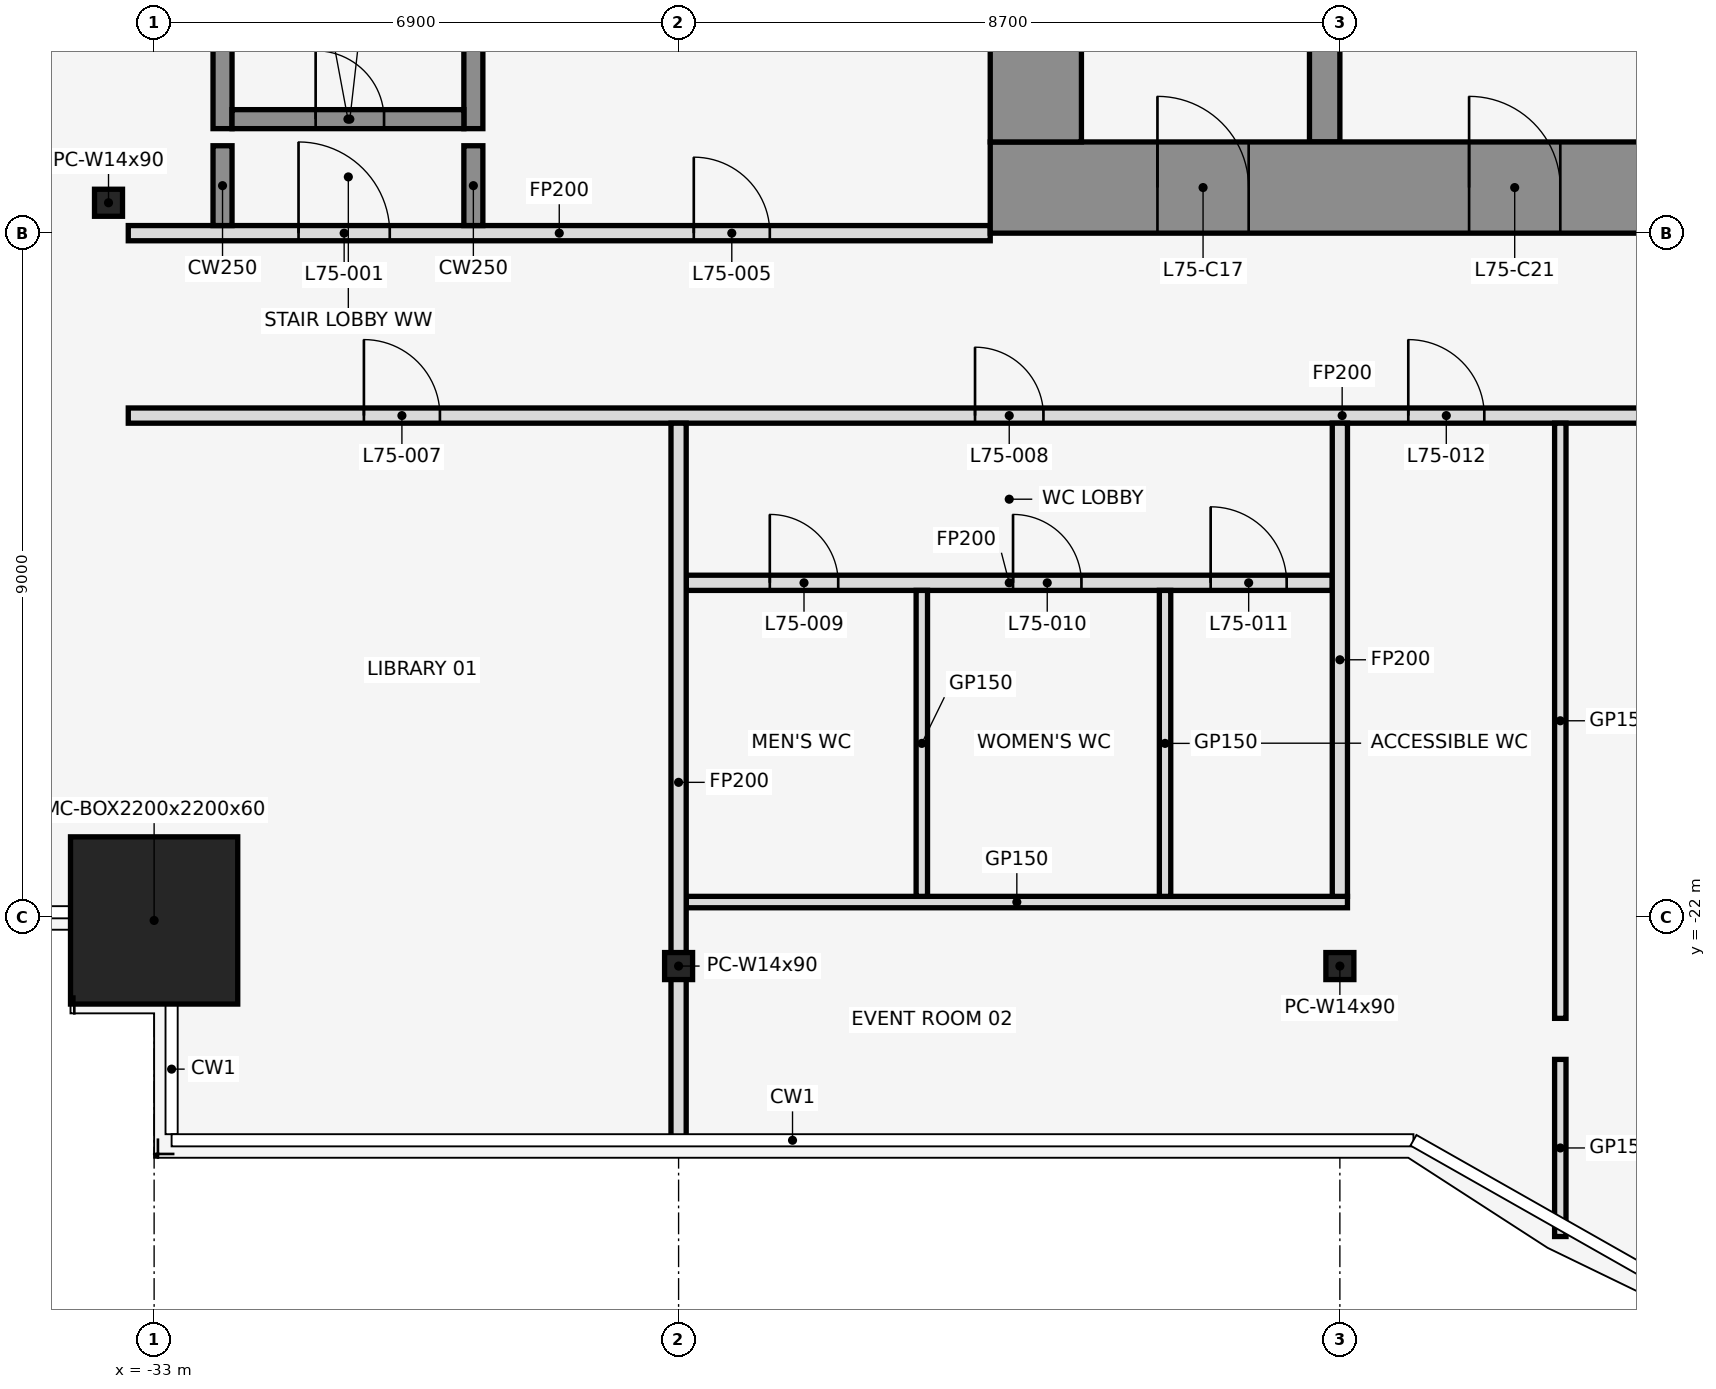
"""IFC4 building model, lengths in metres.
Left out: names, types, materials, properties, quantities, classifications, styles, units other than length and angle.
Written with IfcOpenShell. Run it as: python <this file> out.ifc"""

import sys

from ifc_helpers import new_model, si_unit, direction, frame, frame_2d, origin, origin_2d, place, context, subcontext, project, spatial, rectangle, hollow_rectangle, i_section, extrude, element, fill, save


model = new_model("IFC4")
c1 = context("Model", 3, precision=1e-05, world=origin(), true_north=direction((0.0, 1.0)))
c2 = subcontext(c1, "Body", "Model", "MODEL_VIEW")
j1 = project(units=[si_unit("LENGTHUNIT", "METRE"), si_unit("PLANEANGLEUNIT", "RADIAN")], contexts=[c1])
p1 = place(None, origin())
s1 = spatial("IfcSite", under=j1, at=p1, CompositionType="ELEMENT")
p2 = place(p1, origin())
s2 = spatial("IfcBuilding", under=s1, at=p2, CompositionType="ELEMENT")
p3 = place(p2, frame((0.0, 0.0, 333.5)))
s3 = spatial("IfcBuildingStorey", under=s2, at=p3, CompositionType="ELEMENT", Elevation=333.5)
p4 = place(p3, frame((-33.0, -22.042, 0.0), z_axis=(0.0, 0.0, 1.0), x_axis=(1.0, 0.0, 0.0)))
e1 = element("IfcColumn", 1, at=p4, inside=s3, PredefinedType="COLUMN", context=c2, shape_type="SweptSolid", body=[
    extrude(hollow_rectangle(XDim=2.2, YDim=2.2, WallThickness=0.06, at=origin_2d()), origin(), (0.0, 0.0, 1.0), 4.5),
])
for number, where, z_axis, x_axis in (
    (2, (-26.1, -22.642, 0.0), (0.0, 0.0, 1.0), (1.0, 0.0, 0.0)),
    (3, (-17.4, -22.642, 0.0), (0.0, 0.0, 1.0), (1.0, 0.0, 0.0)),
    (4, (-33.6, -12.6, 0.0), (0.0, 0.0, 1.0), (1.0, 0.0, 0.0)),
):
    element("IfcColumn", number, at=place(p3, frame(where, z_axis=z_axis, x_axis=x_axis)), inside=s3, PredefinedType="COLUMN", context=c2, shape_type="SweptSolid", body=[
        extrude(i_section(OverallWidth=0.368, OverallDepth=0.356, WebThickness=0.011, FlangeThickness=0.018, at=origin_2d()), origin(), (0.0, 0.0, 1.0), 4.5),
    ])
p5 = place(p3, frame((-32.1, -11.625, 0.0), z_axis=(0.0, 0.0, 1.0), x_axis=(0.0, 1.0, 0.0)))
e5 = element("IfcWall", 5, at=p5, inside=s3, PredefinedType="SHEAR", context=c2, shape_type="SweptSolid", body=[
    extrude(rectangle(XDim=7.525, YDim=0.25, at=frame_2d((3.762, 0.0))), origin(), (0.0, 0.0, 1.0), 4.5),
])
p6 = place(p3, frame((-28.8, -11.625, 0.0), z_axis=(0.0, 0.0, 1.0), x_axis=(0.0, 1.0, 0.0)))
e6 = element("IfcWall", 6, at=p6, inside=s3, PredefinedType="SHEAR", context=c2, shape_type="SweptSolid", body=[
    extrude(rectangle(XDim=7.25, YDim=0.25, at=frame_2d((3.625, 0.0))), origin(), (0.0, 0.0, 1.0), 4.5),
])
p7 = place(p3, frame((-31.975, -11.5, 0.0), z_axis=(0.0, 0.0, 1.0), x_axis=(1.0, 0.0, 0.0)))
e7 = element("IfcWall", 7, at=p7, inside=s3, PredefinedType="SHEAR", context=c2, shape_type="SweptSolid", body=[
    extrude(rectangle(XDim=3.05, YDim=0.25, at=frame_2d((1.525, 0.0))), origin(), (0.0, 0.0, 1.0), 4.5),
])
p8 = place(p7, frame((1.1, 0.0, 0.0)))
e8 = element("IfcOpeningElement", 8, at=p8, cuts=e7, PredefinedType="OPENING", context=c2, shape_type="SweptSolid", body=[
    extrude(rectangle(XDim=0.9, YDim=2.1, at=frame_2d((0.45, 1.05))), frame((0.0, 0.137, 0.0), z_axis=(0.0, -1.0, 0.0), x_axis=(1.0, 0.0, 0.0)), (0.0, 0.0, 1.0), 0.274),
])
p9 = place(p3, frame((-26.0, -21.8, 0.0), z_axis=(0.0, 0.0, 1.0), x_axis=(1.0, 0.0, 0.0)))
e9 = element("IfcWall", 9, at=p9, inside=s3, PredefinedType="PARTITIONING", context=c2, shape_type="SweptSolid", body=[
    extrude(rectangle(XDim=8.7, YDim=0.15, at=frame_2d((4.35, 0.0))), origin(), (0.0, 0.0, 1.0), 3.339),
])
p10 = place(p3, frame((-26.0, -17.6, 0.0), z_axis=(0.0, 0.0, 1.0), x_axis=(1.0, 0.0, 0.0)))
e10 = element("IfcWall", 10, at=p10, inside=s3, PredefinedType="PARTITIONING", context=c2, shape_type="SweptSolid", body=[
    extrude(rectangle(XDim=8.5, YDim=0.2, at=frame_2d((4.25, 0.0))), origin(), (0.0, 0.0, 1.0), 3.339),
])
p11 = place(p10, frame((1.1, 0.0, 0.0)))
e11 = element("IfcOpeningElement", 11, at=p11, cuts=e10, PredefinedType="OPENING", context=c2, shape_type="SweptSolid", body=[
    extrude(rectangle(XDim=0.9, YDim=2.1, at=frame_2d((0.45, 1.05))), frame((0.0, 0.112, 0.0), z_axis=(0.0, -1.0, 0.0), x_axis=(1.0, 0.0, 0.0)), (0.0, 0.0, 1.0), 0.224),
])
p12 = place(p10, frame((4.3, 0.0, 0.0)))
e12 = element("IfcOpeningElement", 12, at=p12, cuts=e10, PredefinedType="OPENING", context=c2, shape_type="SweptSolid", body=[
    extrude(rectangle(XDim=0.9, YDim=2.1, at=frame_2d((0.45, 1.05))), frame((0.0, 0.112, 0.0), z_axis=(0.0, -1.0, 0.0), x_axis=(1.0, 0.0, 0.0)), (0.0, 0.0, 1.0), 0.224),
])
p13 = place(p10, frame((6.9, 0.0, 0.0)))
e13 = element("IfcOpeningElement", 13, at=p13, cuts=e10, PredefinedType="OPENING", context=c2, shape_type="SweptSolid", body=[
    extrude(rectangle(XDim=1.0, YDim=2.1, at=frame_2d((0.5, 1.05))), frame((0.0, 0.112, 0.0), z_axis=(0.0, -1.0, 0.0), x_axis=(1.0, 0.0, 0.0)), (0.0, 0.0, 1.0), 0.224),
])
p14 = place(p3, frame((-33.34, -15.4, 0.0), z_axis=(0.0, 0.0, 1.0), x_axis=(1.0, 0.0, 0.0)))
e14 = element("IfcWall", 14, at=p14, inside=s3, PredefinedType="PARTITIONING", context=c2, shape_type="SweptSolid", body=[
    extrude(rectangle(XDim=31.94, YDim=0.2, at=frame_2d((15.97, 0.0))), origin(), (0.0, 0.0, 1.0), 3.339),
])
p15 = place(p14, frame((3.1, 0.0, 0.0)))
e15 = element("IfcOpeningElement", 15, at=p15, cuts=e14, PredefinedType="OPENING", context=c2, shape_type="SweptSolid", body=[
    extrude(rectangle(XDim=1.0, YDim=2.1, at=frame_2d((0.5, 1.05))), frame((0.0, 0.112, 0.0), z_axis=(0.0, -1.0, 0.0), x_axis=(1.0, 0.0, 0.0)), (0.0, 0.0, 1.0), 0.224),
])
p16 = place(p14, frame((11.14, 0.0, 0.0)))
e16 = element("IfcOpeningElement", 16, at=p16, cuts=e14, PredefinedType="OPENING", context=c2, shape_type="SweptSolid", body=[
    extrude(rectangle(XDim=0.9, YDim=2.1, at=frame_2d((0.45, 1.05))), frame((0.0, 0.112, 0.0), z_axis=(0.0, -1.0, 0.0), x_axis=(1.0, 0.0, 0.0)), (0.0, 0.0, 1.0), 0.224),
])
p17 = place(p14, frame((16.84, 0.0, 0.0)))
e17 = element("IfcOpeningElement", 17, at=p17, cuts=e14, PredefinedType="OPENING", context=c2, shape_type="SweptSolid", body=[
    extrude(rectangle(XDim=1.0, YDim=2.1, at=frame_2d((0.5, 1.05))), frame((0.0, 0.112, 0.0), z_axis=(0.0, -1.0, 0.0), x_axis=(1.0, 0.0, 0.0)), (0.0, 0.0, 1.0), 0.224),
])
p18 = place(p3, frame((-33.34, -13.0, 0.0), z_axis=(0.0, 0.0, 1.0), x_axis=(1.0, 0.0, 0.0)))
e18 = element("IfcWall", 18, at=p18, inside=s3, PredefinedType="PARTITIONING", context=c2, shape_type="SweptSolid", body=[
    extrude(rectangle(XDim=11.34, YDim=0.2, at=frame_2d((5.67, 0.0))), origin(), (0.0, 0.0, 1.0), 3.339),
])
p19 = place(p18, frame((2.24, 0.0, 0.0)))
e19 = element("IfcOpeningElement", 19, at=p19, cuts=e18, PredefinedType="OPENING", context=c2, shape_type="SweptSolid", body=[
    extrude(rectangle(XDim=1.2, YDim=2.1, at=frame_2d((0.6, 1.05))), frame((0.0, 0.112, 0.0), z_axis=(0.0, -1.0, 0.0), x_axis=(1.0, 0.0, 0.0)), (0.0, 0.0, 1.0), 0.224),
])
p20 = place(p18, frame((7.44, 0.0, 0.0)))
e20 = element("IfcOpeningElement", 20, at=p20, cuts=e18, PredefinedType="OPENING", context=c2, shape_type="SweptSolid", body=[
    extrude(rectangle(XDim=1.0, YDim=2.1, at=frame_2d((0.5, 1.05))), frame((0.0, 0.112, 0.0), z_axis=(0.0, -1.0, 0.0), x_axis=(1.0, 0.0, 0.0)), (0.0, 0.0, 1.0), 0.224),
])
for number, where, z_axis, x_axis in (
    (21, (-32.1, -12.9, 0.0), (0.0, 0.0, 1.0), (0.0, 1.0, 0.0)),
    (22, (-28.8, -12.9, 0.0), (0.0, 0.0, 1.0), (0.0, 1.0, 0.0)),
):
    element("IfcWall", number, at=place(p3, frame(where, z_axis=z_axis, x_axis=x_axis)), inside=s3, PredefinedType="SHEAR", context=c2, shape_type="SweptSolid", body=[
        extrude(rectangle(XDim=1.05, YDim=0.25, at=frame_2d((0.525, 0.0))), origin(), (0.0, 0.0, 1.0), 4.5),
    ])
p21 = place(p3, frame((-26.1, -24.95, 0.0), z_axis=(0.0, 0.0, 1.0), x_axis=(0.0, 1.0, 0.0)))
e23 = element("IfcWall", 23, at=p21, inside=s3, PredefinedType="PARTITIONING", context=c2, shape_type="SweptSolid", body=[
    extrude(rectangle(XDim=9.45, YDim=0.2, at=frame_2d((4.725, 0.0))), origin(), (0.0, 0.0, 1.0), 3.339),
])
for number, where, z_axis, x_axis in (
    (24, (-22.9, -21.725, 0.0), (0.0, 0.0, 1.0), (0.0, 1.0, 0.0)),
    (25, (-19.7, -21.725, 0.0), (0.0, 0.0, 1.0), (0.0, 1.0, 0.0)),
):
    element("IfcWall", number, at=place(p3, frame(where, z_axis=z_axis, x_axis=x_axis)), inside=s3, PredefinedType="PARTITIONING", context=c2, shape_type="SweptSolid", body=[
        extrude(rectangle(XDim=4.025, YDim=0.15, at=frame_2d((2.013, 0.0))), origin(), (0.0, 0.0, 1.0), 3.339),
    ])
p22 = place(p3, frame((-17.4, -21.725, 0.0), z_axis=(0.0, 0.0, 1.0), x_axis=(0.0, 1.0, 0.0)))
e26 = element("IfcWall", 26, at=p22, inside=s3, PredefinedType="PARTITIONING", context=c2, shape_type="SweptSolid", body=[
    extrude(rectangle(XDim=6.225, YDim=0.2, at=frame_2d((3.113, 0.0))), origin(), (0.0, 0.0, 1.0), 3.339),
])
p23 = place(p3, frame((-14.5, -26.2, 0.0), z_axis=(0.0, 0.0, 1.0), x_axis=(0.0, 1.0, 0.0)))
e27 = element("IfcWall", 27, at=p23, inside=s3, PredefinedType="PARTITIONING", context=c2, shape_type="SweptSolid", body=[
    extrude(rectangle(XDim=2.33, YDim=0.15, at=frame_2d((1.165, 0.0))), origin(), (0.0, 0.0, 1.0), 3.339),
])
p24 = place(p3, frame((-14.5, -23.33, 0.0), z_axis=(0.0, 0.0, 1.0), x_axis=(0.0, 1.0, 0.0)))
e28 = element("IfcWall", 28, at=p24, inside=s3, PredefinedType="PARTITIONING", context=c2, shape_type="SweptSolid", body=[
    extrude(rectangle(XDim=7.83, YDim=0.15, at=frame_2d((3.915, 0.0))), origin(), (0.0, 0.0, 1.0), 3.339),
])
p25 = place(p3, frame((-17.6, -11.8, 0.0), z_axis=(0.0, 0.0, 1.0), x_axis=(0.0, 1.0, 0.0)))
e29 = element("IfcWall", 29, at=p25, inside=s3, PredefinedType="SHEAR", context=c2, shape_type="SweptSolid", body=[
    extrude(rectangle(XDim=10.6, YDim=0.4, at=frame_2d((5.3, 0.0))), origin(), (0.0, 0.0, 1.0), 4.5),
])
p26 = place(p25, frame((1.25, 0.0, 0.0)))
e30 = element("IfcOpeningElement", 30, at=p26, cuts=e29, PredefinedType="OPENING", context=c2, shape_type="SweptSolid", body=[
    extrude(rectangle(XDim=1.1, YDim=2.1, at=frame_2d((0.55, 1.05))), frame((0.0, 0.212, 0.0), z_axis=(0.0, -1.0, 0.0), x_axis=(1.0, 0.0, 0.0)), (0.0, 0.0, 1.0), 0.424),
])
p27 = place(p25, frame((3.95, 0.0, 0.0)))
e31 = element("IfcOpeningElement", 31, at=p27, cuts=e29, PredefinedType="OPENING", context=c2, shape_type="SweptSolid", body=[
    extrude(rectangle(XDim=1.1, YDim=2.1, at=frame_2d((0.55, 1.05))), frame((0.0, 0.212, 0.0), z_axis=(0.0, -1.0, 0.0), x_axis=(1.0, 0.0, 0.0)), (0.0, 0.0, 1.0), 0.424),
])
p28 = place(p3, frame((-22.0, -12.4, 0.0), z_axis=(0.0, 0.0, 1.0), x_axis=(1.0, 0.0, 0.0)))
e32 = element("IfcWall", 32, at=p28, inside=s3, PredefinedType="SHEAR", context=c2, shape_type="SweptSolid", body=[
    extrude(rectangle(XDim=44.0, YDim=1.2, at=frame_2d((22.0, 0.0))), origin(), (0.0, 0.0, 1.0), 4.5),
])
p29 = place(p28, frame((2.2, 0.0, 0.0)))
e33 = element("IfcOpeningElement", 33, at=p29, cuts=e32, PredefinedType="OPENING", context=c2, shape_type="SweptSolid", body=[
    extrude(rectangle(XDim=1.2, YDim=2.1, at=frame_2d((0.6, 1.05))), frame((0.0, 0.612, 0.0), z_axis=(0.0, -1.0, 0.0), x_axis=(1.0, 0.0, 0.0)), (0.0, 0.0, 1.0), 1.224),
])
p30 = place(p28, frame((21.4, 0.0, 0.0)))
e34 = element("IfcOpeningElement", 34, at=p30, cuts=e32, PredefinedType="OPENING", context=c2, shape_type="SweptSolid", body=[
    extrude(rectangle(XDim=1.2, YDim=2.1, at=frame_2d((0.6, 1.05))), frame((0.0, 0.612, 0.0), z_axis=(0.0, -1.0, 0.0), x_axis=(1.0, 0.0, 0.0)), (0.0, 0.0, 1.0), 1.224),
])
p31 = place(p28, frame((40.6, 0.0, 0.0)))
e35 = element("IfcOpeningElement", 35, at=p31, cuts=e32, PredefinedType="OPENING", context=c2, shape_type="SweptSolid", body=[
    extrude(rectangle(XDim=1.2, YDim=2.1, at=frame_2d((0.6, 1.05))), frame((0.0, 0.612, 0.0), z_axis=(0.0, -1.0, 0.0), x_axis=(1.0, 0.0, 0.0)), (0.0, 0.0, 1.0), 1.224),
])
p32 = place(p28, frame((16.0, 0.0, 0.0)))
e36 = element("IfcOpeningElement", 36, at=p32, cuts=e32, PredefinedType="OPENING", context=c2, shape_type="SweptSolid", body=[
    extrude(rectangle(XDim=1.8, YDim=2.1, at=frame_2d((0.9, 1.05))), frame((0.0, 0.612, 0.0), z_axis=(0.0, -1.0, 0.0), x_axis=(1.0, 0.0, 0.0)), (0.0, 0.0, 1.0), 1.224),
])
p33 = place(p28, frame((6.3, 0.0, 0.0)))
e37 = element("IfcOpeningElement", 37, at=p33, cuts=e32, PredefinedType="OPENING", context=c2, shape_type="SweptSolid", body=[
    extrude(rectangle(XDim=1.2, YDim=2.1, at=frame_2d((0.6, 1.05))), frame((0.0, 0.612, 0.0), z_axis=(0.0, -1.0, 0.0), x_axis=(1.0, 0.0, 0.0)), (0.0, 0.0, 1.0), 1.224),
])
p34 = place(p28, frame((26.2, 0.0, 0.0)))
e38 = element("IfcOpeningElement", 38, at=p34, cuts=e32, PredefinedType="OPENING", context=c2, shape_type="SweptSolid", body=[
    extrude(rectangle(XDim=1.8, YDim=2.1, at=frame_2d((0.9, 1.05))), frame((0.0, 0.612, 0.0), z_axis=(0.0, -1.0, 0.0), x_axis=(1.0, 0.0, 0.0)), (0.0, 0.0, 1.0), 1.224),
])
p35 = place(p28, frame((36.5, 0.0, 0.0)))
e39 = element("IfcOpeningElement", 39, at=p35, cuts=e32, PredefinedType="OPENING", context=c2, shape_type="SweptSolid", body=[
    extrude(rectangle(XDim=1.2, YDim=2.1, at=frame_2d((0.6, 1.05))), frame((0.0, 0.612, 0.0), z_axis=(0.0, -1.0, 0.0), x_axis=(1.0, 0.0, 0.0)), (0.0, 0.0, 1.0), 1.224),
])
p36 = place(p3, frame((-21.4, -11.8, 0.0), z_axis=(0.0, 0.0, 1.0), x_axis=(0.0, 1.0, 0.0)))
e40 = element("IfcWall", 40, at=p36, inside=s3, PredefinedType="SHEAR", context=c2, shape_type="SweptSolid", body=[
    extrude(rectangle(XDim=10.6, YDim=1.2, at=frame_2d((5.3, 0.0))), origin(), (0.0, 0.0, 1.0), 4.5),
])
p37 = place(p19, origin())
e41 = element("IfcDoor", 41, at=p37, inside=s3, OperationType="SINGLE_SWING_LEFT", PredefinedType="DOOR", context=c2, shape_type="SweptSolid", body=[
    extrude(rectangle(XDim=1.2, YDim=2.1, at=frame_2d((0.6, 1.05))), frame((0.0, 0.025, 0.0), z_axis=(0.0, -1.0, 0.0), x_axis=(1.0, 0.0, 0.0)), (0.0, 0.0, 1.0), 0.05),
])
fill(e19, e41)
p38 = place(p8, origin())
e42 = element("IfcDoor", 42, at=p38, inside=s3, OperationType="SINGLE_SWING_LEFT", PredefinedType="DOOR", context=c2, shape_type="SweptSolid", body=[
    extrude(rectangle(XDim=0.9, YDim=2.1, at=frame_2d((0.45, 1.05))), frame((0.0, 0.025, 0.0), z_axis=(0.0, -1.0, 0.0), x_axis=(1.0, 0.0, 0.0)), (0.0, 0.0, 1.0), 0.05),
])
fill(e8, e42)
p39 = place(p20, origin())
e43 = element("IfcDoor", 43, at=p39, inside=s3, OperationType="SINGLE_SWING_LEFT", PredefinedType="DOOR", context=c2, shape_type="SweptSolid", body=[
    extrude(rectangle(XDim=1.0, YDim=2.1, at=frame_2d((0.5, 1.05))), frame((0.0, 0.025, 0.0), z_axis=(0.0, -1.0, 0.0), x_axis=(1.0, 0.0, 0.0)), (0.0, 0.0, 1.0), 0.05),
])
fill(e20, e43)
p40 = place(p15, frame((1.0, 0.0, 0.0), z_axis=(0.0, 0.0, 1.0), x_axis=(-1.0, 0.0, 0.0)))
e44 = element("IfcDoor", 44, at=p40, inside=s3, OperationType="SINGLE_SWING_LEFT", PredefinedType="DOOR", context=c2, shape_type="SweptSolid", body=[
    extrude(rectangle(XDim=1.0, YDim=2.1, at=frame_2d((0.5, 1.05))), frame((0.0, 0.025, 0.0), z_axis=(0.0, -1.0, 0.0), x_axis=(1.0, 0.0, 0.0)), (0.0, 0.0, 1.0), 0.05),
])
fill(e15, e44)
p41 = place(p16, frame((0.9, 0.0, 0.0), z_axis=(0.0, 0.0, 1.0), x_axis=(-1.0, 0.0, 0.0)))
e45 = element("IfcDoor", 45, at=p41, inside=s3, OperationType="SINGLE_SWING_RIGHT", PredefinedType="DOOR", context=c2, shape_type="SweptSolid", body=[
    extrude(rectangle(XDim=0.9, YDim=2.1, at=frame_2d((0.45, 1.05))), frame((0.0, 0.025, 0.0), z_axis=(0.0, -1.0, 0.0), x_axis=(1.0, 0.0, 0.0)), (0.0, 0.0, 1.0), 0.05),
])
fill(e16, e45)
p42 = place(p11, frame((0.9, 0.0, 0.0), z_axis=(0.0, 0.0, 1.0), x_axis=(-1.0, 0.0, 0.0)))
e46 = element("IfcDoor", 46, at=p42, inside=s3, OperationType="SINGLE_SWING_RIGHT", PredefinedType="DOOR", context=c2, shape_type="SweptSolid", body=[
    extrude(rectangle(XDim=0.9, YDim=2.1, at=frame_2d((0.45, 1.05))), frame((0.0, 0.025, 0.0), z_axis=(0.0, -1.0, 0.0), x_axis=(1.0, 0.0, 0.0)), (0.0, 0.0, 1.0), 0.05),
])
fill(e11, e46)
p43 = place(p12, frame((0.9, 0.0, 0.0), z_axis=(0.0, 0.0, 1.0), x_axis=(-1.0, 0.0, 0.0)))
e47 = element("IfcDoor", 47, at=p43, inside=s3, OperationType="SINGLE_SWING_LEFT", PredefinedType="DOOR", context=c2, shape_type="SweptSolid", body=[
    extrude(rectangle(XDim=0.9, YDim=2.1, at=frame_2d((0.45, 1.05))), frame((0.0, 0.025, 0.0), z_axis=(0.0, -1.0, 0.0), x_axis=(1.0, 0.0, 0.0)), (0.0, 0.0, 1.0), 0.05),
])
fill(e12, e47)
p44 = place(p13, frame((1.0, 0.0, 0.0), z_axis=(0.0, 0.0, 1.0), x_axis=(-1.0, 0.0, 0.0)))
e48 = element("IfcDoor", 48, at=p44, inside=s3, OperationType="SINGLE_SWING_RIGHT", PredefinedType="DOOR", context=c2, shape_type="SweptSolid", body=[
    extrude(rectangle(XDim=1.0, YDim=2.1, at=frame_2d((0.5, 1.05))), frame((0.0, 0.025, 0.0), z_axis=(0.0, -1.0, 0.0), x_axis=(1.0, 0.0, 0.0)), (0.0, 0.0, 1.0), 0.05),
])
fill(e13, e48)
p45 = place(p17, frame((1.0, 0.0, 0.0), z_axis=(0.0, 0.0, 1.0), x_axis=(-1.0, 0.0, 0.0)))
e49 = element("IfcDoor", 49, at=p45, inside=s3, OperationType="SINGLE_SWING_RIGHT", PredefinedType="DOOR", context=c2, shape_type="SweptSolid", body=[
    extrude(rectangle(XDim=1.0, YDim=2.1, at=frame_2d((0.5, 1.05))), frame((0.0, 0.025, 0.0), z_axis=(0.0, -1.0, 0.0), x_axis=(1.0, 0.0, 0.0)), (0.0, 0.0, 1.0), 0.05),
])
fill(e17, e49)
p46 = place(p29, frame((1.2, 0.0, 0.0), z_axis=(0.0, 0.0, 1.0), x_axis=(-1.0, 0.0, 0.0)))
e50 = element("IfcDoor", 50, at=p46, inside=s3, OperationType="SINGLE_SWING_RIGHT", PredefinedType="DOOR", context=c2, shape_type="SweptSolid", body=[
    extrude(rectangle(XDim=1.2, YDim=2.1, at=frame_2d((0.6, 1.05))), frame((0.0, 0.025, 0.0), z_axis=(0.0, -1.0, 0.0), x_axis=(1.0, 0.0, 0.0)), (0.0, 0.0, 1.0), 0.05),
])
fill(e33, e50)
p47 = place(p33, frame((1.2, 0.0, 0.0), z_axis=(0.0, 0.0, 1.0), x_axis=(-1.0, 0.0, 0.0)))
e51 = element("IfcDoor", 51, at=p47, inside=s3, OperationType="SINGLE_SWING_RIGHT", PredefinedType="DOOR", context=c2, shape_type="SweptSolid", body=[
    extrude(rectangle(XDim=1.2, YDim=2.1, at=frame_2d((0.6, 1.05))), frame((0.0, 0.025, 0.0), z_axis=(0.0, -1.0, 0.0), x_axis=(1.0, 0.0, 0.0)), (0.0, 0.0, 1.0), 0.05),
])
fill(e37, e51)
save(model, sys.argv[1])
